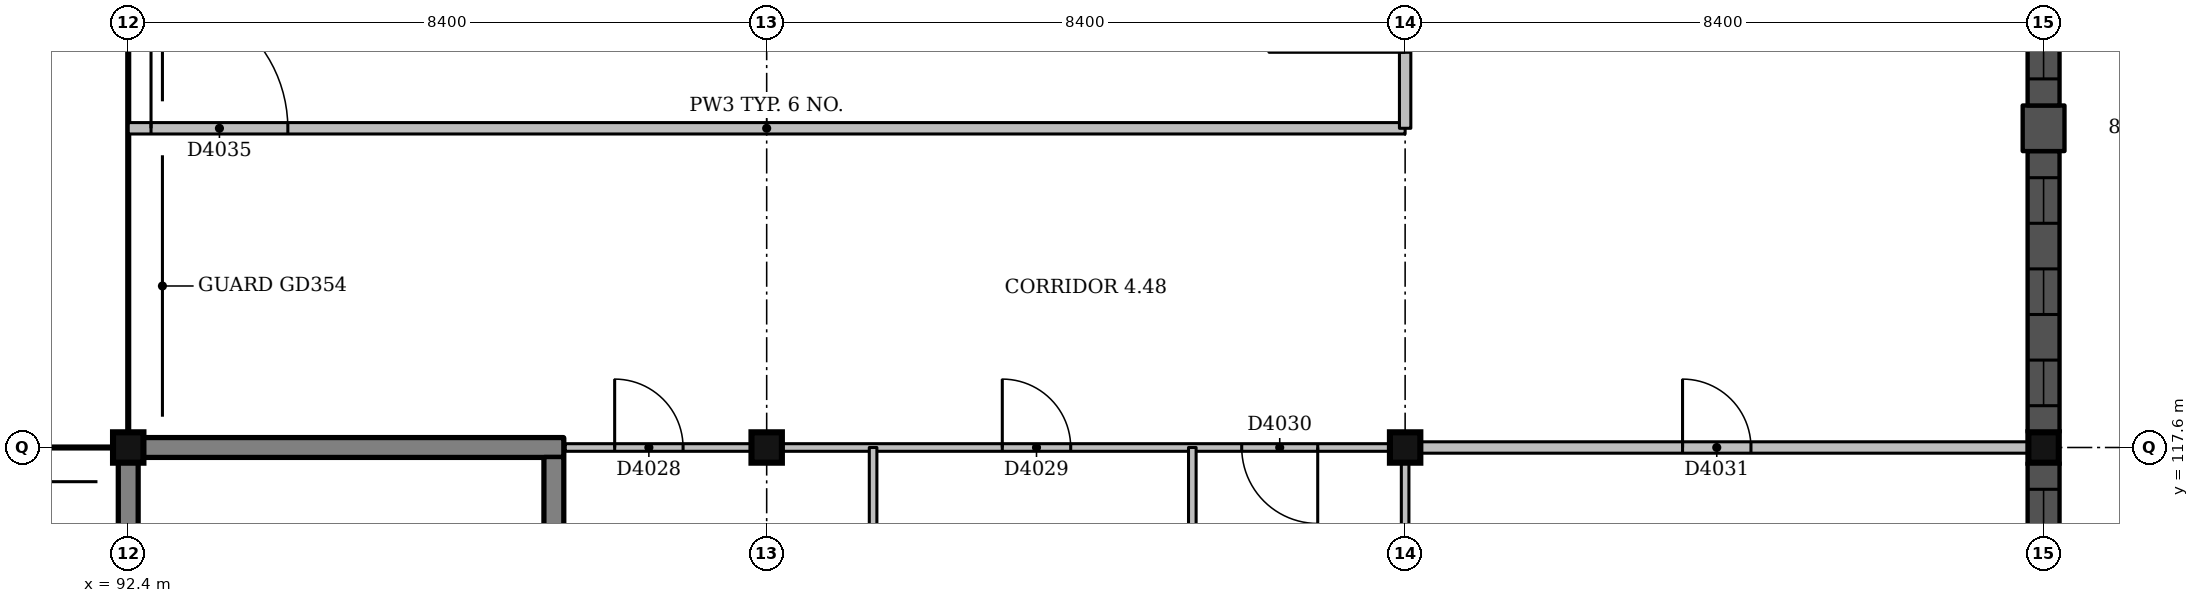
"""IFC4 building model, lengths in metres.
Left out: names, types, materials, properties, quantities, classifications, styles, units other than length and angle.
Written with IfcOpenShell. Run it as: python <this file> out.ifc"""

import sys

from ifc_helpers import new_model, si_unit, direction, frame, frame_2d, origin, origin_2d, place, context, subcontext, project, spatial, rectangle, extrude, element, fill, save


model = new_model("IFC4")
c1 = context("Model", 3, precision=1e-05, world=origin(), true_north=direction((0.0, 1.0)))
c2 = subcontext(c1, "Body", "Model", "MODEL_VIEW")
j1 = project(units=[si_unit("LENGTHUNIT", "METRE"), si_unit("PLANEANGLEUNIT", "RADIAN")], contexts=[c1])
p1 = place(None, origin())
s1 = spatial("IfcSite", under=j1, at=p1, CompositionType="ELEMENT")
p2 = place(p1, origin())
s2 = spatial("IfcBuilding", under=s1, at=p2, CompositionType="ELEMENT")
p3 = place(p2, frame((0.0, 0.0, 18.0)))
s3 = spatial("IfcBuildingStorey", under=s2, at=p3, CompositionType="ELEMENT", Elevation=18.0)
for number, where, z_axis, x_axis in (
    (1, (92.4, 117.6, 0.0), (0.0, 0.0, 1.0), (1.0, 0.0, 0.0)),
    (2, (100.8, 117.6, 0.0), (0.0, 0.0, 1.0), (1.0, 0.0, 0.0)),
    (3, (109.2, 117.6, 0.0), (0.0, 0.0, 1.0), (1.0, 0.0, 0.0)),
    (4, (117.6, 117.6, 0.0), (0.0, 0.0, 1.0), (1.0, 0.0, 0.0)),
):
    element("IfcColumn", number, at=place(p3, frame(where, z_axis=z_axis, x_axis=x_axis)), inside=s3, PredefinedType="COLUMN", context=c2, shape_type="SweptSolid", body=[
        extrude(rectangle(XDim=0.4, YDim=0.4, at=origin_2d()), origin(), (0.0, 0.0, 1.0), 4.5),
    ])
p4 = place(p3, frame((92.6, 117.6, 0.0), z_axis=(0.0, 0.0, 1.0), x_axis=(1.0, 0.0, 0.0)))
e5 = element("IfcWall", 5, at=p4, inside=s3, PredefinedType="SHEAR", context=c2, shape_type="SweptSolid", body=[
    extrude(rectangle(XDim=5.525, YDim=0.25, at=frame_2d((2.762, 0.0))), origin(), (0.0, 0.0, 1.0), 4.5),
])
p5 = place(p3, frame((92.4, 109.4, 0.0), z_axis=(0.0, 0.0, 1.0), x_axis=(0.0, 1.0, 0.0)))
e6 = element("IfcWall", 6, at=p5, inside=s3, PredefinedType="SHEAR", context=c2, shape_type="SweptSolid", body=[
    extrude(rectangle(XDim=8.0, YDim=0.25, at=frame_2d((4.0, 0.0))), origin(), (0.0, 0.0, 1.0), 4.5),
])
p6 = place(p5, frame((0.45, 0.0, 0.0)))
e7 = element("IfcOpeningElement", 7, at=p6, cuts=e6, PredefinedType="OPENING", context=c2, shape_type="SweptSolid", body=[
    extrude(rectangle(XDim=1.0, YDim=2.1, at=frame_2d((0.5, 1.05))), frame((0.0, 0.135, 0.0), z_axis=(0.0, -1.0, 0.0), x_axis=(1.0, 0.0, 0.0)), (0.0, 0.0, 1.0), 0.27),
])
p7 = place(p3, frame((98.0, 109.325, 0.0), z_axis=(0.0, 0.0, 1.0), x_axis=(0.0, 1.0, 0.0)))
e8 = element("IfcWall", 8, at=p7, inside=s3, PredefinedType="SHEAR", context=c2, shape_type="SweptSolid", body=[
    extrude(rectangle(XDim=8.15, YDim=0.25, at=frame_2d((4.075, 0.0))), origin(), (0.0, 0.0, 1.0), 4.5),
])
p8 = place(p3, frame((117.6, 113.7, 0.0), z_axis=(0.0, 0.0, 1.0), x_axis=(0.0, 1.0, 0.0)))
e9 = element("IfcWall", 9, at=p8, inside=s3, PredefinedType="SOLIDWALL", context=c2, shape_type="SweptSolid", body=[
    extrude(rectangle(XDim=3.7, YDim=0.42, at=frame_2d((1.85, 0.0))), origin(), (0.0, 0.0, 1.0), 4.2),
])
p9 = place(p8, frame((0.35, 0.0, 1.0)))
e10 = element("IfcOpeningElement", 10, at=p9, cuts=e9, PredefinedType="OPENING", context=c2, shape_type="SweptSolid", body=[
    extrude(rectangle(XDim=0.6, YDim=2.1, at=frame_2d((0.3, 1.05))), frame((0.0, 0.22, 0.0), z_axis=(0.0, -1.0, 0.0), x_axis=(1.0, 0.0, 0.0)), (0.0, 0.0, 1.0), 0.44),
])
p10 = place(p8, frame((1.55, 0.0, 1.0)))
e11 = element("IfcOpeningElement", 11, at=p10, cuts=e9, PredefinedType="OPENING", context=c2, shape_type="SweptSolid", body=[
    extrude(rectangle(XDim=0.6, YDim=2.1, at=frame_2d((0.3, 1.05))), frame((0.0, 0.22, 0.0), z_axis=(0.0, -1.0, 0.0), x_axis=(1.0, 0.0, 0.0)), (0.0, 0.0, 1.0), 0.44),
])
p11 = place(p8, frame((2.75, 0.0, 1.0)))
e12 = element("IfcOpeningElement", 12, at=p11, cuts=e9, PredefinedType="OPENING", context=c2, shape_type="SweptSolid", body=[
    extrude(rectangle(XDim=0.6, YDim=2.1, at=frame_2d((0.3, 1.05))), frame((0.0, 0.22, 0.0), z_axis=(0.0, -1.0, 0.0), x_axis=(1.0, 0.0, 0.0)), (0.0, 0.0, 1.0), 0.44),
])
p12 = place(p3, frame((117.6, 117.8, 0.0), z_axis=(0.0, 0.0, 1.0), x_axis=(0.0, 1.0, 0.0)))
e13 = element("IfcWall", 13, at=p12, inside=s3, PredefinedType="SOLIDWALL", context=c2, shape_type="SweptSolid", body=[
    extrude(rectangle(XDim=3.7, YDim=0.42, at=frame_2d((1.85, 0.0))), origin(), (0.0, 0.0, 1.0), 3.45),
])
p13 = place(p12, frame((0.35, 0.0, 1.0)))
e14 = element("IfcOpeningElement", 14, at=p13, cuts=e13, PredefinedType="OPENING", context=c2, shape_type="SweptSolid", body=[
    extrude(rectangle(XDim=0.6, YDim=2.1, at=frame_2d((0.3, 1.05))), frame((0.0, 0.22, 0.0), z_axis=(0.0, -1.0, 0.0), x_axis=(1.0, 0.0, 0.0)), (0.0, 0.0, 1.0), 0.44),
])
p14 = place(p12, frame((1.55, 0.0, 1.0)))
e15 = element("IfcOpeningElement", 15, at=p14, cuts=e13, PredefinedType="OPENING", context=c2, shape_type="SweptSolid", body=[
    extrude(rectangle(XDim=0.6, YDim=2.1, at=frame_2d((0.3, 1.05))), frame((0.0, 0.22, 0.0), z_axis=(0.0, -1.0, 0.0), x_axis=(1.0, 0.0, 0.0)), (0.0, 0.0, 1.0), 0.44),
])
p15 = place(p12, frame((2.75, 0.0, 1.0)))
e16 = element("IfcOpeningElement", 16, at=p15, cuts=e13, PredefinedType="OPENING", context=c2, shape_type="SweptSolid", body=[
    extrude(rectangle(XDim=0.6, YDim=2.1, at=frame_2d((0.3, 1.05))), frame((0.0, 0.22, 0.0), z_axis=(0.0, -1.0, 0.0), x_axis=(1.0, 0.0, 0.0)), (0.0, 0.0, 1.0), 0.44),
])
p16 = place(p3, frame((117.6, 121.5, 0.0), z_axis=(0.0, 0.0, 1.0), x_axis=(0.0, 1.0, 0.0)))
e17 = element("IfcWall", 17, at=p16, inside=s3, PredefinedType="SOLIDWALL", context=c2, shape_type="SweptSolid", body=[
    extrude(rectangle(XDim=0.6, YDim=0.55, at=frame_2d((0.3, 0.0))), origin(), (0.0, 0.0, 1.0), 3.45),
])
p17 = place(p3, frame((117.6, 122.1, 0.0), z_axis=(0.0, 0.0, 1.0), x_axis=(0.0, 1.0, 0.0)))
e18 = element("IfcWall", 18, at=p17, inside=s3, PredefinedType="SOLIDWALL", context=c2, shape_type="SweptSolid", body=[
    extrude(rectangle(XDim=3.7, YDim=0.42, at=frame_2d((1.85, 0.0))), origin(), (0.0, 0.0, 1.0), 3.45),
])
p18 = place(p17, frame((0.35, 0.0, 1.0)))
e19 = element("IfcOpeningElement", 19, at=p18, cuts=e18, PredefinedType="OPENING", context=c2, shape_type="SweptSolid", body=[
    extrude(rectangle(XDim=0.6, YDim=2.1, at=frame_2d((0.3, 1.05))), frame((0.0, 0.22, 0.0), z_axis=(0.0, -1.0, 0.0), x_axis=(1.0, 0.0, 0.0)), (0.0, 0.0, 1.0), 0.44),
])
p19 = place(p17, frame((1.55, 0.0, 1.0)))
e20 = element("IfcOpeningElement", 20, at=p19, cuts=e18, PredefinedType="OPENING", context=c2, shape_type="SweptSolid", body=[
    extrude(rectangle(XDim=0.6, YDim=2.1, at=frame_2d((0.3, 1.05))), frame((0.0, 0.22, 0.0), z_axis=(0.0, -1.0, 0.0), x_axis=(1.0, 0.0, 0.0)), (0.0, 0.0, 1.0), 0.44),
])
p20 = place(p17, frame((2.75, 0.0, 1.0)))
e21 = element("IfcOpeningElement", 21, at=p20, cuts=e18, PredefinedType="OPENING", context=c2, shape_type="SweptSolid", body=[
    extrude(rectangle(XDim=0.6, YDim=2.1, at=frame_2d((0.3, 1.05))), frame((0.0, 0.22, 0.0), z_axis=(0.0, -1.0, 0.0), x_axis=(1.0, 0.0, 0.0)), (0.0, 0.0, 1.0), 0.44),
])
p21 = place(p3, frame((109.4, 117.6, 0.0), z_axis=(0.0, 0.0, 1.0), x_axis=(1.0, 0.0, 0.0)))
e22 = element("IfcWall", 22, at=p21, inside=s3, PredefinedType="PARTITIONING", context=c2, shape_type="SweptSolid", body=[
    extrude(rectangle(XDim=8.0, YDim=0.15, at=frame_2d((4.0, 0.0))), origin(), (0.0, 0.0, 1.0), 3.5),
])
p22 = place(p21, frame((3.45, 0.0, 0.0)))
e23 = element("IfcOpeningElement", 23, at=p22, cuts=e22, PredefinedType="OPENING", context=c2, shape_type="SweptSolid", body=[
    extrude(rectangle(XDim=0.9, YDim=2.1, at=frame_2d((0.45, 1.05))), frame((0.0, 0.085, 0.0), z_axis=(0.0, -1.0, 0.0), x_axis=(1.0, 0.0, 0.0)), (0.0, 0.0, 1.0), 0.17),
])
p23 = place(p3, frame((98.15, 117.6, 0.0), z_axis=(0.0, 0.0, 1.0), x_axis=(1.0, 0.0, 0.0)))
e24 = element("IfcWall", 24, at=p23, inside=s3, PredefinedType="PARTITIONING", context=c2, shape_type="SweptSolid", body=[
    extrude(rectangle(XDim=2.45, YDim=0.1, at=frame_2d((1.225, 0.0))), origin(), (0.0, 0.0, 1.0), 3.6),
])
p24 = place(p23, frame((0.65, 0.0, 0.0)))
e25 = element("IfcOpeningElement", 25, at=p24, cuts=e24, PredefinedType="OPENING", context=c2, shape_type="SweptSolid", body=[
    extrude(rectangle(XDim=0.9, YDim=2.1, at=frame_2d((0.45, 1.05))), frame((0.0, 0.06, 0.0), z_axis=(0.0, -1.0, 0.0), x_axis=(1.0, 0.0, 0.0)), (0.0, 0.0, 1.0), 0.12),
])
p25 = place(p3, frame((101.0, 117.6, 0.0), z_axis=(0.0, 0.0, 1.0), x_axis=(1.0, 0.0, 0.0)))
e26 = element("IfcWall", 26, at=p25, inside=s3, PredefinedType="PARTITIONING", context=c2, shape_type="SweptSolid", body=[
    extrude(rectangle(XDim=8.0, YDim=0.1, at=frame_2d((4.0, 0.0))), origin(), (0.0, 0.0, 1.0), 3.5),
])
p26 = place(p25, frame((2.9, 0.0, 0.0)))
e27 = element("IfcOpeningElement", 27, at=p26, cuts=e26, PredefinedType="OPENING", context=c2, shape_type="SweptSolid", body=[
    extrude(rectangle(XDim=0.9, YDim=2.1, at=frame_2d((0.45, 1.05))), frame((0.0, 0.06, 0.0), z_axis=(0.0, -1.0, 0.0), x_axis=(1.0, 0.0, 0.0)), (0.0, 0.0, 1.0), 0.12),
])
p27 = place(p25, frame((6.05, 0.0, 0.0)))
e28 = element("IfcOpeningElement", 28, at=p27, cuts=e26, PredefinedType="OPENING", context=c2, shape_type="SweptSolid", body=[
    extrude(rectangle(XDim=1.0, YDim=2.1, at=frame_2d((0.5, 1.05))), frame((0.0, 0.06, 0.0), z_axis=(0.0, -1.0, 0.0), x_axis=(1.0, 0.0, 0.0)), (0.0, 0.0, 1.0), 0.12),
])
p28 = place(p3, frame((92.4, 121.8, 0.0), z_axis=(0.0, 0.0, 1.0), x_axis=(1.0, 0.0, 0.0)))
e29 = element("IfcWall", 29, at=p28, inside=s3, PredefinedType="PARTITIONING", context=c2, shape_type="SweptSolid", body=[
    extrude(rectangle(XDim=16.8, YDim=0.15, at=frame_2d((8.4, 0.0))), origin(), (0.0, 0.0, 1.0), 3.45),
])
p29 = place(p28, frame((0.3, 0.0, 0.0)))
e30 = element("IfcOpeningElement", 30, at=p29, cuts=e29, PredefinedType="OPENING", context=c2, shape_type="SweptSolid", body=[
    extrude(rectangle(XDim=1.8, YDim=2.1, at=frame_2d((0.9, 1.05))), frame((0.0, 0.085, 0.0), z_axis=(0.0, -1.0, 0.0), x_axis=(1.0, 0.0, 0.0)), (0.0, 0.0, 1.0), 0.17),
])
for number, where, z_axis, x_axis in (
    (31, (102.2, 109.425, 0.0), (0.0, 0.0, 1.0), (0.0, 1.0, 0.0)),
    (32, (106.4, 109.425, 0.0), (0.0, 0.0, 1.0), (0.0, 1.0, 0.0)),
):
    element("IfcWall", number, at=place(p3, frame(where, z_axis=z_axis, x_axis=x_axis)), inside=s3, PredefinedType="PARTITIONING", context=c2, shape_type="SweptSolid", body=[
        extrude(rectangle(XDim=8.175, YDim=0.1, at=frame_2d((4.087, 0.0))), origin(), (0.0, 0.0, 1.0), 3.5),
    ])
p30 = place(p3, frame((109.2, 121.8, 0.0), z_axis=(0.0, 0.0, 1.0), x_axis=(0.0, 1.0, 0.0)))
e33 = element("IfcWall", 33, at=p30, inside=s3, PredefinedType="PARTITIONING", context=c2, shape_type="SweptSolid", body=[
    extrude(rectangle(XDim=4.0, YDim=0.15, at=frame_2d((2.0, 0.0))), origin(), (0.0, 0.0, 1.0), 3.5),
])
p31 = place(p30, frame((1.0, 0.0, 0.0)))
e34 = element("IfcOpeningElement", 34, at=p31, cuts=e33, PredefinedType="OPENING", context=c2, shape_type="SweptSolid", body=[
    extrude(rectangle(XDim=1.8, YDim=2.1, at=frame_2d((0.9, 1.05))), frame((0.0, 0.085, 0.0), z_axis=(0.0, -1.0, 0.0), x_axis=(1.0, 0.0, 0.0)), (0.0, 0.0, 1.0), 0.17),
])
p32 = place(p3, frame((109.2, 109.4, 0.0), z_axis=(0.0, 0.0, 1.0), x_axis=(0.0, 1.0, 0.0)))
e35 = element("IfcWall", 35, at=p32, inside=s3, PredefinedType="PARTITIONING", context=c2, shape_type="SweptSolid", body=[
    extrude(rectangle(XDim=8.0, YDim=0.1, at=frame_2d((4.0, 0.0))), origin(), (0.0, 0.0, 1.0), 4.15),
])
p33 = place(p11, origin())
e36 = element("IfcWindow", 36, at=p33, inside=s3, PartitioningType="SINGLE_PANEL", PredefinedType="WINDOW", context=c2, shape_type="SweptSolid", body=[
    extrude(rectangle(XDim=0.6, YDim=2.1, at=frame_2d((0.3, 1.05))), frame((0.0, 0.15, 0.0), z_axis=(0.0, -1.0, 0.0), x_axis=(1.0, 0.0, 0.0)), (0.0, 0.0, 1.0), 0.06),
])
fill(e12, e36)
p34 = place(p13, origin())
e37 = element("IfcWindow", 37, at=p34, inside=s3, PartitioningType="SINGLE_PANEL", PredefinedType="WINDOW", context=c2, shape_type="SweptSolid", body=[
    extrude(rectangle(XDim=0.6, YDim=2.1, at=frame_2d((0.3, 1.05))), frame((0.0, 0.15, 0.0), z_axis=(0.0, -1.0, 0.0), x_axis=(1.0, 0.0, 0.0)), (0.0, 0.0, 1.0), 0.06),
])
fill(e14, e37)
p35 = place(p14, origin())
e38 = element("IfcWindow", 38, at=p35, inside=s3, PartitioningType="SINGLE_PANEL", PredefinedType="WINDOW", context=c2, shape_type="SweptSolid", body=[
    extrude(rectangle(XDim=0.6, YDim=2.1, at=frame_2d((0.3, 1.05))), frame((0.0, 0.15, 0.0), z_axis=(0.0, -1.0, 0.0), x_axis=(1.0, 0.0, 0.0)), (0.0, 0.0, 1.0), 0.06),
])
fill(e15, e38)
p36 = place(p15, origin())
e39 = element("IfcWindow", 39, at=p36, inside=s3, PartitioningType="SINGLE_PANEL", PredefinedType="WINDOW", context=c2, shape_type="SweptSolid", body=[
    extrude(rectangle(XDim=0.6, YDim=2.1, at=frame_2d((0.3, 1.05))), frame((0.0, 0.15, 0.0), z_axis=(0.0, -1.0, 0.0), x_axis=(1.0, 0.0, 0.0)), (0.0, 0.0, 1.0), 0.06),
])
fill(e16, e39)
p37 = place(p18, origin())
e40 = element("IfcWindow", 40, at=p37, inside=s3, PartitioningType="SINGLE_PANEL", PredefinedType="WINDOW", context=c2, shape_type="SweptSolid", body=[
    extrude(rectangle(XDim=0.6, YDim=2.1, at=frame_2d((0.3, 1.05))), frame((0.0, 0.15, 0.0), z_axis=(0.0, -1.0, 0.0), x_axis=(1.0, 0.0, 0.0)), (0.0, 0.0, 1.0), 0.06),
])
fill(e19, e40)
p38 = place(p24, origin())
e41 = element("IfcDoor", 41, at=p38, inside=s3, OperationType="SINGLE_SWING_LEFT", PredefinedType="DOOR", context=c2, shape_type="SweptSolid", body=[
    extrude(rectangle(XDim=0.9, YDim=2.1, at=frame_2d((0.45, 1.05))), frame((0.0, 0.025, 0.0), z_axis=(0.0, -1.0, 0.0), x_axis=(1.0, 0.0, 0.0)), (0.0, 0.0, 1.0), 0.05),
])
fill(e25, e41)
p39 = place(p26, origin())
e42 = element("IfcDoor", 42, at=p39, inside=s3, OperationType="SINGLE_SWING_LEFT", PredefinedType="DOOR", context=c2, shape_type="SweptSolid", body=[
    extrude(rectangle(XDim=0.9, YDim=2.1, at=frame_2d((0.45, 1.05))), frame((0.0, 0.025, 0.0), z_axis=(0.0, -1.0, 0.0), x_axis=(1.0, 0.0, 0.0)), (0.0, 0.0, 1.0), 0.05),
])
fill(e27, e42)
p40 = place(p27, origin())
e43 = element("IfcDoor", 43, at=p40, inside=s3, OperationType="SINGLE_SWING_RIGHT", PredefinedType="DOOR", context=c2, shape_type="SweptSolid", body=[
    extrude(rectangle(XDim=1.0, YDim=2.1, at=frame_2d((0.5, 1.05))), frame((0.0, 0.025, 0.0), z_axis=(0.0, -1.0, 0.0), x_axis=(1.0, 0.0, 0.0)), (0.0, 0.0, 1.0), 0.05),
])
fill(e28, e43)
p41 = place(p22, origin())
e44 = element("IfcDoor", 44, at=p41, inside=s3, OperationType="SINGLE_SWING_LEFT", PredefinedType="DOOR", context=c2, shape_type="SweptSolid", body=[
    extrude(rectangle(XDim=0.9, YDim=2.1, at=frame_2d((0.45, 1.05))), frame((0.0, 0.025, 0.0), z_axis=(0.0, -1.0, 0.0), x_axis=(1.0, 0.0, 0.0)), (0.0, 0.0, 1.0), 0.05),
])
fill(e23, e44)
p42 = place(p29, origin())
e45 = element("IfcDoor", 45, at=p42, inside=s3, OperationType="DOUBLE_DOOR_SINGLE_SWING", PredefinedType="DOOR", context=c2, shape_type="SweptSolid", body=[
    extrude(rectangle(XDim=1.8, YDim=2.1, at=frame_2d((0.9, 1.05))), frame((0.0, 0.025, 0.0), z_axis=(0.0, -1.0, 0.0), x_axis=(1.0, 0.0, 0.0)), (0.0, 0.0, 1.0), 0.05),
])
fill(e30, e45)
save(model, sys.argv[1])
